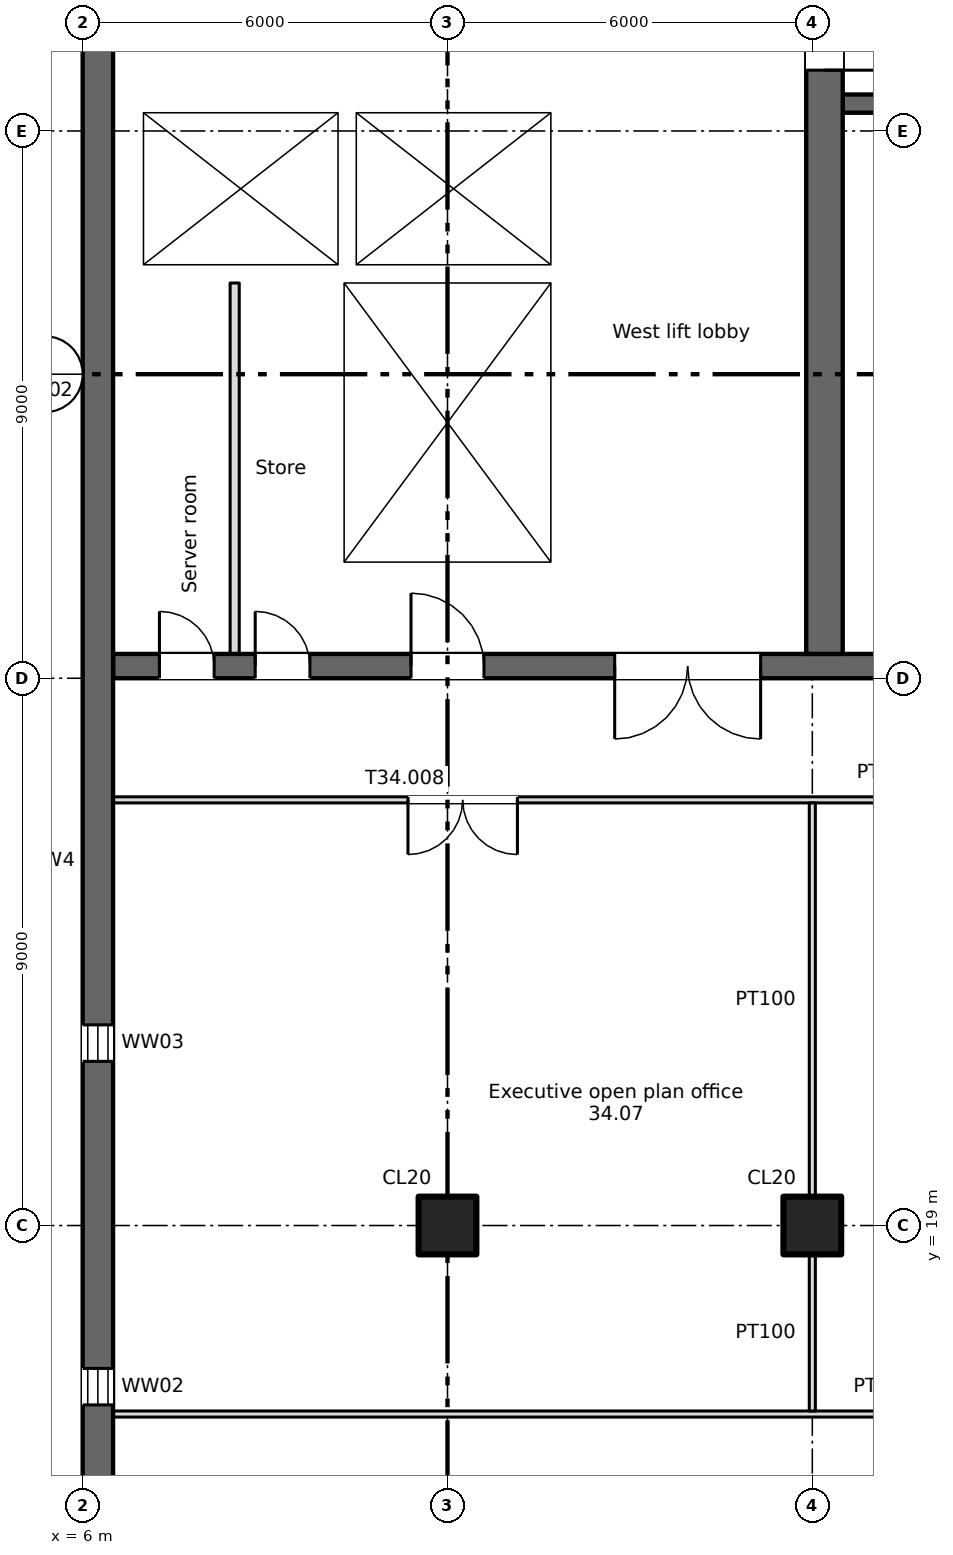
"""IFC4 building model, lengths in metres.
Left out: names, types, materials, properties, quantities, classifications, styles, units other than length and angle.
Written with IfcOpenShell. Run it as: python <this file> out.ifc"""

import sys

from ifc_helpers import new_model, si_unit, direction, frame, frame_2d, origin, origin_2d, place, context, subcontext, project, spatial, rectangle, extrude, element, fill, save


model = new_model("IFC4")
c1 = context("Model", 3, precision=1e-05, world=origin(), true_north=direction((0.0, 1.0)))
c2 = subcontext(c1, "Body", "Model", "MODEL_VIEW")
j1 = project(units=[si_unit("LENGTHUNIT", "METRE"), si_unit("PLANEANGLEUNIT", "RADIAN")], contexts=[c1])
p1 = place(None, origin())
s1 = spatial("IfcSite", under=j1, at=p1, CompositionType="ELEMENT")
p2 = place(p1, origin())
s2 = spatial("IfcBuilding", under=s1, at=p2, CompositionType="ELEMENT")
p3 = place(p2, frame((0.0, 0.0, 235.55)))
s3 = spatial("IfcBuildingStorey", under=s2, at=p3, CompositionType="ELEMENT", Elevation=235.55)
for number, where, z_axis, x_axis in (
    (1, (12.0, 19.0, 0.0), (0.0, 0.0, 1.0), (1.0, 0.0, 0.0)),
    (2, (18.0, 19.0, 0.0), (0.0, 0.0, 1.0), (1.0, 0.0, 0.0)),
):
    element("IfcColumn", number, at=place(p3, frame(where, z_axis=z_axis, x_axis=x_axis)), inside=s3, PredefinedType="COLUMN", context=c2, shape_type="SweptSolid", body=[
        extrude(rectangle(XDim=0.95, YDim=0.95, at=origin_2d()), origin(), (0.0, 0.0, 1.0), 3.4),
    ])
p4 = place(p3, frame((6.25, 8.5, 0.0), z_axis=(0.0, 0.0, 1.0), x_axis=(0.0, 1.0, 0.0)))
e3 = element("IfcWall", 3, at=p4, inside=s3, PredefinedType="SHEAR", context=c2, shape_type="SweptSolid", body=[
    extrude(rectangle(XDim=33.0, YDim=0.5, at=frame_2d((16.5, 0.0))), origin(), (0.0, 0.0, 1.0), 3.4),
])
p5 = place(p4, frame((1.6, 0.0, 0.6)))
e4 = element("IfcOpeningElement", 4, at=p5, cuts=e3, PredefinedType="OPENING", context=c2, shape_type="SweptSolid", body=[
    extrude(rectangle(XDim=0.6, YDim=2.4, at=frame_2d((0.3, 1.2))), frame((0.0, 0.26, 0.0), z_axis=(0.0, -1.0, 0.0), x_axis=(1.0, 0.0, 0.0)), (0.0, 0.0, 1.0), 0.52),
])
p6 = place(p4, frame((7.55, 0.0, 0.6)))
e5 = element("IfcOpeningElement", 5, at=p6, cuts=e3, PredefinedType="OPENING", context=c2, shape_type="SweptSolid", body=[
    extrude(rectangle(XDim=0.6, YDim=2.4, at=frame_2d((0.3, 1.2))), frame((0.0, 0.26, 0.0), z_axis=(0.0, -1.0, 0.0), x_axis=(1.0, 0.0, 0.0)), (0.0, 0.0, 1.0), 0.52),
])
p7 = place(p4, frame((13.2, 0.0, 0.6)))
e6 = element("IfcOpeningElement", 6, at=p7, cuts=e3, PredefinedType="OPENING", context=c2, shape_type="SweptSolid", body=[
    extrude(rectangle(XDim=0.6, YDim=2.4, at=frame_2d((0.3, 1.2))), frame((0.0, 0.26, 0.0), z_axis=(0.0, -1.0, 0.0), x_axis=(1.0, 0.0, 0.0)), (0.0, 0.0, 1.0), 0.52),
])
p8 = place(p3, frame((6.5, 28.2, 0.0), z_axis=(0.0, 0.0, 1.0), x_axis=(1.0, 0.0, 0.0)))
e7 = element("IfcWall", 7, at=p8, inside=s3, PredefinedType="SHEAR", context=c2, shape_type="SweptSolid", body=[
    extrude(rectangle(XDim=58.0, YDim=0.4, at=frame_2d((29.0, 0.0))), origin(), (0.0, 0.0, 1.0), 3.4),
])
p9 = place(p8, frame((13.012, 0.0, 0.0)))
e8 = element("IfcOpeningElement", 8, at=p9, cuts=e7, PredefinedType="OPENING", context=c2, shape_type="SweptSolid", body=[
    extrude(rectangle(XDim=0.9, YDim=2.1, at=frame_2d((0.45, 1.05))), frame((0.0, 0.21, 0.0), z_axis=(0.0, -1.0, 0.0), x_axis=(1.0, 0.0, 0.0)), (0.0, 0.0, 1.0), 0.42),
])
p10 = place(p8, frame((15.587, 0.0, 0.0)))
e9 = element("IfcOpeningElement", 9, at=p10, cuts=e7, PredefinedType="OPENING", context=c2, shape_type="SweptSolid", body=[
    extrude(rectangle(XDim=0.9, YDim=2.1, at=frame_2d((0.45, 1.05))), frame((0.0, 0.21, 0.0), z_axis=(0.0, -1.0, 0.0), x_axis=(1.0, 0.0, 0.0)), (0.0, 0.0, 1.0), 0.42),
])
p11 = place(p8, frame((48.512, 0.0, 0.0)))
e10 = element("IfcOpeningElement", 10, at=p11, cuts=e7, PredefinedType="OPENING", context=c2, shape_type="SweptSolid", body=[
    extrude(rectangle(XDim=0.9, YDim=2.1, at=frame_2d((0.45, 1.05))), frame((0.0, 0.21, 0.0), z_axis=(0.0, -1.0, 0.0), x_axis=(1.0, 0.0, 0.0)), (0.0, 0.0, 1.0), 0.42),
])
p12 = place(p8, frame((51.087, 0.0, 0.0)))
e11 = element("IfcOpeningElement", 11, at=p12, cuts=e7, PredefinedType="OPENING", context=c2, shape_type="SweptSolid", body=[
    extrude(rectangle(XDim=0.9, YDim=2.1, at=frame_2d((0.45, 1.05))), frame((0.0, 0.21, 0.0), z_axis=(0.0, -1.0, 0.0), x_axis=(1.0, 0.0, 0.0)), (0.0, 0.0, 1.0), 0.42),
])
p13 = place(p8, frame((0.762, 0.0, 0.0)))
e12 = element("IfcOpeningElement", 12, at=p13, cuts=e7, PredefinedType="OPENING", context=c2, shape_type="SweptSolid", body=[
    extrude(rectangle(XDim=0.9, YDim=2.1, at=frame_2d((0.45, 1.05))), frame((0.0, 0.21, 0.0), z_axis=(0.0, -1.0, 0.0), x_axis=(1.0, 0.0, 0.0)), (0.0, 0.0, 1.0), 0.42),
])
p14 = place(p8, frame((2.337, 0.0, 0.0)))
e13 = element("IfcOpeningElement", 13, at=p14, cuts=e7, PredefinedType="OPENING", context=c2, shape_type="SweptSolid", body=[
    extrude(rectangle(XDim=0.9, YDim=2.1, at=frame_2d((0.45, 1.05))), frame((0.0, 0.21, 0.0), z_axis=(0.0, -1.0, 0.0), x_axis=(1.0, 0.0, 0.0)), (0.0, 0.0, 1.0), 0.42),
])
p15 = place(p8, frame((4.9, 0.0, 0.0)))
e14 = element("IfcOpeningElement", 14, at=p15, cuts=e7, PredefinedType="OPENING", context=c2, shape_type="SweptSolid", body=[
    extrude(rectangle(XDim=1.2, YDim=2.1, at=frame_2d((0.6, 1.05))), frame((0.0, 0.21, 0.0), z_axis=(0.0, -1.0, 0.0), x_axis=(1.0, 0.0, 0.0)), (0.0, 0.0, 1.0), 0.42),
])
p16 = place(p8, frame((31.9, 0.0, 0.0)))
e15 = element("IfcOpeningElement", 15, at=p16, cuts=e7, PredefinedType="OPENING", context=c2, shape_type="SweptSolid", body=[
    extrude(rectangle(XDim=1.2, YDim=2.1, at=frame_2d((0.6, 1.05))), frame((0.0, 0.21, 0.0), z_axis=(0.0, -1.0, 0.0), x_axis=(1.0, 0.0, 0.0)), (0.0, 0.0, 1.0), 0.42),
])
p17 = place(p8, frame((55.4, 0.0, 0.0)))
e16 = element("IfcOpeningElement", 16, at=p17, cuts=e7, PredefinedType="OPENING", context=c2, shape_type="SweptSolid", body=[
    extrude(rectangle(XDim=1.2, YDim=2.1, at=frame_2d((0.6, 1.05))), frame((0.0, 0.21, 0.0), z_axis=(0.0, -1.0, 0.0), x_axis=(1.0, 0.0, 0.0)), (0.0, 0.0, 1.0), 0.42),
])
p18 = place(p8, frame((21.9, 0.0, 0.0)))
e17 = element("IfcOpeningElement", 17, at=p18, cuts=e7, PredefinedType="OPENING", context=c2, shape_type="SweptSolid", body=[
    extrude(rectangle(XDim=1.2, YDim=2.1, at=frame_2d((0.6, 1.05))), frame((0.0, 0.21, 0.0), z_axis=(0.0, -1.0, 0.0), x_axis=(1.0, 0.0, 0.0)), (0.0, 0.0, 1.0), 0.42),
])
p19 = place(p8, frame((41.9, 0.0, 0.0)))
e18 = element("IfcOpeningElement", 18, at=p19, cuts=e7, PredefinedType="OPENING", context=c2, shape_type="SweptSolid", body=[
    extrude(rectangle(XDim=1.2, YDim=2.1, at=frame_2d((0.6, 1.05))), frame((0.0, 0.21, 0.0), z_axis=(0.0, -1.0, 0.0), x_axis=(1.0, 0.0, 0.0)), (0.0, 0.0, 1.0), 0.42),
])
p20 = place(p8, frame((25.05, 0.0, 0.0)))
e19 = element("IfcOpeningElement", 19, at=p20, cuts=e7, PredefinedType="OPENING", context=c2, shape_type="SweptSolid", body=[
    extrude(rectangle(XDim=2.4, YDim=2.1, at=frame_2d((1.2, 1.05))), frame((0.0, 0.21, 0.0), z_axis=(0.0, -1.0, 0.0), x_axis=(1.0, 0.0, 0.0)), (0.0, 0.0, 1.0), 0.42),
])
p21 = place(p8, frame((37.55, 0.0, 0.0)))
e20 = element("IfcOpeningElement", 20, at=p21, cuts=e7, PredefinedType="OPENING", context=c2, shape_type="SweptSolid", body=[
    extrude(rectangle(XDim=2.4, YDim=2.1, at=frame_2d((1.2, 1.05))), frame((0.0, 0.21, 0.0), z_axis=(0.0, -1.0, 0.0), x_axis=(1.0, 0.0, 0.0)), (0.0, 0.0, 1.0), 0.42),
])
p22 = place(p8, frame((8.25, 0.0, 0.0)))
e21 = element("IfcOpeningElement", 21, at=p22, cuts=e7, PredefinedType="OPENING", context=c2, shape_type="SweptSolid", body=[
    extrude(rectangle(XDim=2.4, YDim=2.1, at=frame_2d((1.2, 1.05))), frame((0.0, 0.21, 0.0), z_axis=(0.0, -1.0, 0.0), x_axis=(1.0, 0.0, 0.0)), (0.0, 0.0, 1.0), 0.42),
])
p23 = place(p8, frame((29.05, 0.0, 0.0)))
e22 = element("IfcOpeningElement", 22, at=p23, cuts=e7, PredefinedType="OPENING", context=c2, shape_type="SweptSolid", body=[
    extrude(rectangle(XDim=0.9, YDim=2.1, at=frame_2d((0.45, 1.05))), frame((0.0, 0.21, 0.0), z_axis=(0.0, -1.0, 0.0), x_axis=(1.0, 0.0, 0.0)), (0.0, 0.0, 1.0), 0.42),
])
p24 = place(p8, frame((35.05, 0.0, 0.0)))
e23 = element("IfcOpeningElement", 23, at=p24, cuts=e7, PredefinedType="OPENING", context=c2, shape_type="SweptSolid", body=[
    extrude(rectangle(XDim=0.9, YDim=2.1, at=frame_2d((0.45, 1.05))), frame((0.0, 0.21, 0.0), z_axis=(0.0, -1.0, 0.0), x_axis=(1.0, 0.0, 0.0)), (0.0, 0.0, 1.0), 0.42),
])
p25 = place(p3, frame((6.75, 28.4, 0.0), z_axis=(0.0, 0.0, 1.0), x_axis=(0.0, 1.0, 0.0)))
e24 = element("IfcWall", 24, at=p25, inside=s3, PredefinedType="SHEAR", context=c2, shape_type="SweptSolid", body=[
    extrude(rectangle(XDim=12.85, YDim=0.5, at=frame_2d((6.425, 0.0))), origin(), (0.0, 0.0, 1.0), 3.4),
])
p26 = place(p3, frame((18.2, 28.4, 0.0), z_axis=(0.0, 0.0, 1.0), x_axis=(0.0, 1.0, 0.0)))
e25 = element("IfcWall", 25, at=p26, inside=s3, PredefinedType="SHEAR", context=c2, shape_type="SweptSolid", body=[
    extrude(rectangle(XDim=17.0, YDim=0.6, at=frame_2d((8.5, 0.0))), origin(), (0.0, 0.0, 1.0), 3.4),
])
p27 = place(p26, frame((9.6, 0.0, 0.0)))
e26 = element("IfcOpeningElement", 26, at=p27, cuts=e25, PredefinedType="OPENING", context=c2, shape_type="SweptSolid", body=[
    extrude(rectangle(XDim=2.0, YDim=2.1, at=frame_2d((1.0, 1.05))), frame((0.0, 0.31, 0.0), z_axis=(0.0, -1.0, 0.0), x_axis=(1.0, 0.0, 0.0)), (0.0, 0.0, 1.0), 0.62),
])
p28 = place(p26, frame((15.45, 0.0, 0.0)))
e27 = element("IfcOpeningElement", 27, at=p28, cuts=e25, PredefinedType="OPENING", context=c2, shape_type="SweptSolid", body=[
    extrude(rectangle(XDim=1.2, YDim=2.1, at=frame_2d((0.6, 1.05))), frame((0.0, 0.31, 0.0), z_axis=(0.0, -1.0, 0.0), x_axis=(1.0, 0.0, 0.0)), (0.0, 0.0, 1.0), 0.62),
])
for number, where, z_axis, x_axis in (
    (28, (10.15, 28.4, 0.0), (0.0, 0.0, 1.0), (0.0, 1.0, 0.0)),
    (29, (13.85, 28.4, 0.0), (0.0, 0.0, 1.0), (0.0, 1.0, 0.0)),
):
    element("IfcWall", number, at=place(p3, frame(where, z_axis=z_axis, x_axis=x_axis)), inside=s3, PredefinedType="SHEAR", context=c2, shape_type="SweptSolid", body=[
        extrude(rectangle(XDim=6.1, YDim=0.3, at=frame_2d((3.05, 0.0))), origin(), (0.0, 0.0, 1.0), 3.4),
    ])
p29 = place(p3, frame((7.0, 34.65, 0.0), z_axis=(0.0, 0.0, 1.0), x_axis=(1.0, 0.0, 0.0)))
e30 = element("IfcWall", 30, at=p29, inside=s3, PredefinedType="SHEAR", context=c2, shape_type="SweptSolid", body=[
    extrude(rectangle(XDim=7.0, YDim=0.3, at=frame_2d((3.5, 0.0))), origin(), (0.0, 0.0, 1.0), 3.4),
])
p30 = place(p3, frame((18.5, 34.65, 0.0), z_axis=(0.0, 0.0, 1.0), x_axis=(1.0, 0.0, 0.0)))
e31 = element("IfcWall", 31, at=p30, inside=s3, PredefinedType="SHEAR", context=c2, shape_type="SweptSolid", body=[
    extrude(rectangle(XDim=12.2, YDim=0.3, at=frame_2d((6.1, 0.0))), origin(), (0.0, 0.0, 1.0), 3.4),
])
p31 = place(p30, frame((9.8, 0.0, 0.0)))
e32 = element("IfcOpeningElement", 32, at=p31, cuts=e31, PredefinedType="OPENING", context=c2, shape_type="SweptSolid", body=[
    extrude(rectangle(XDim=1.1, YDim=2.1, at=frame_2d((0.55, 1.05))), frame((0.0, 0.16, 0.0), z_axis=(0.0, -1.0, 0.0), x_axis=(1.0, 0.0, 0.0)), (0.0, 0.0, 1.0), 0.32),
])
p32 = place(p3, frame((7.0, 37.45, 0.0), z_axis=(0.0, 0.0, 1.0), x_axis=(1.0, 0.0, 0.0)))
e33 = element("IfcWall", 33, at=p32, inside=s3, PredefinedType="SHEAR", context=c2, shape_type="SweptSolid", body=[
    extrude(rectangle(XDim=7.0, YDim=0.3, at=frame_2d((3.5, 0.0))), origin(), (0.0, 0.0, 1.0), 3.4),
])
p33 = place(p32, frame((1.05, 0.0, 0.0)))
e34 = element("IfcOpeningElement", 34, at=p33, cuts=e33, PredefinedType="OPENING", context=c2, shape_type="SweptSolid", body=[
    extrude(rectangle(XDim=1.1, YDim=2.1, at=frame_2d((0.55, 1.05))), frame((0.0, 0.16, 0.0), z_axis=(0.0, -1.0, 0.0), x_axis=(1.0, 0.0, 0.0)), (0.0, 0.0, 1.0), 0.32),
])
p34 = place(p32, frame((4.55, 0.0, 0.0)))
e35 = element("IfcOpeningElement", 35, at=p34, cuts=e33, PredefinedType="OPENING", context=c2, shape_type="SweptSolid", body=[
    extrude(rectangle(XDim=1.1, YDim=2.1, at=frame_2d((0.55, 1.05))), frame((0.0, 0.16, 0.0), z_axis=(0.0, -1.0, 0.0), x_axis=(1.0, 0.0, 0.0)), (0.0, 0.0, 1.0), 0.32),
])
p35 = place(p3, frame((30.7, 37.45, 0.0), z_axis=(0.0, 0.0, 1.0), x_axis=(-1.0, 0.0, 0.0)))
e36 = element("IfcWall", 36, at=p35, inside=s3, PredefinedType="SHEAR", context=c2, shape_type="SweptSolid", body=[
    extrude(rectangle(XDim=12.2, YDim=0.3, at=frame_2d((6.1, 0.0))), origin(), (0.0, 0.0, 1.0), 3.4),
])
p36 = place(p35, frame((7.4, 0.0, 0.0)))
e37 = element("IfcOpeningElement", 37, at=p36, cuts=e36, PredefinedType="OPENING", context=c2, shape_type="SweptSolid", body=[
    extrude(rectangle(XDim=0.9, YDim=2.1, at=frame_2d((0.45, 1.05))), frame((0.0, 0.16, 0.0), z_axis=(0.0, -1.0, 0.0), x_axis=(1.0, 0.0, 0.0)), (0.0, 0.0, 1.0), 0.32),
])
for number, where, z_axis, x_axis in (
    (38, (13.85, 34.8, 0.0), (0.0, 0.0, 1.0), (0.0, 1.0, 0.0)),
    (39, (10.35, 34.8, 0.0), (0.0, 0.0, 1.0), (0.0, 1.0, 0.0)),
):
    element("IfcWall", number, at=place(p3, frame(where, z_axis=z_axis, x_axis=x_axis)), inside=s3, PredefinedType="SHEAR", context=c2, shape_type="SweptSolid", body=[
        extrude(rectangle(XDim=2.5, YDim=0.3, at=frame_2d((1.25, 0.0))), origin(), (0.0, 0.0, 1.0), 3.4),
    ])
p37 = place(p3, frame((8.5, 28.4, 0.0), z_axis=(0.0, 0.0, 1.0), x_axis=(0.0, 1.0, 0.0)))
e40 = element("IfcWall", 40, at=p37, inside=s3, PredefinedType="PARTITIONING", context=c2, shape_type="SweptSolid", body=[
    extrude(rectangle(XDim=6.1, YDim=0.15, at=frame_2d((3.05, 0.0))), origin(), (0.0, 0.0, 1.0), 3.4),
])
p38 = place(p3, frame((6.5, 15.9, 0.0), z_axis=(0.0, 0.0, 1.0), x_axis=(1.0, 0.0, 0.0)))
e41 = element("IfcWall", 41, at=p38, inside=s3, PredefinedType="PARTITIONING", context=c2, shape_type="SweptSolid", body=[
    extrude(rectangle(XDim=25.35, YDim=0.1, at=frame_2d((12.675, 0.0))), origin(), (0.0, 0.0, 1.0), 3.4),
])
p39 = place(p3, frame((6.5, 26.0, 0.0), z_axis=(0.0, 0.0, 1.0), x_axis=(1.0, 0.0, 0.0)))
e42 = element("IfcWall", 42, at=p39, inside=s3, PredefinedType="PARTITIONING", context=c2, shape_type="SweptSolid", body=[
    extrude(rectangle(XDim=25.45, YDim=0.1, at=frame_2d((12.725, 0.0))), origin(), (0.0, 0.0, 1.0), 3.4),
])
p40 = place(p39, frame((17.55, 0.0, 0.0)))
e43 = element("IfcOpeningElement", 43, at=p40, cuts=e42, PredefinedType="OPENING", context=c2, shape_type="SweptSolid", body=[
    extrude(rectangle(XDim=1.8, YDim=2.1, at=frame_2d((0.9, 1.05))), frame((0.0, 0.06, 0.0), z_axis=(0.0, -1.0, 0.0), x_axis=(1.0, 0.0, 0.0)), (0.0, 0.0, 1.0), 0.12),
])
p41 = place(p39, frame((4.85, 0.0, 0.0)))
e44 = element("IfcOpeningElement", 44, at=p41, cuts=e42, PredefinedType="OPENING", context=c2, shape_type="SweptSolid", body=[
    extrude(rectangle(XDim=1.8, YDim=2.1, at=frame_2d((0.9, 1.05))), frame((0.0, 0.06, 0.0), z_axis=(0.0, -1.0, 0.0), x_axis=(1.0, 0.0, 0.0)), (0.0, 0.0, 1.0), 0.12),
])
p42 = place(p3, frame((18.0, 15.95, 0.0), z_axis=(0.0, 0.0, 1.0), x_axis=(0.0, 1.0, 0.0)))
e45 = element("IfcWall", 45, at=p42, inside=s3, PredefinedType="PARTITIONING", context=c2, shape_type="SweptSolid", body=[
    extrude(rectangle(XDim=2.575, YDim=0.1, at=frame_2d((1.288, 0.0))), origin(), (0.0, 0.0, 1.0), 3.4),
])
p43 = place(p3, frame((18.0, 19.475, 0.0), z_axis=(0.0, 0.0, 1.0), x_axis=(0.0, 1.0, 0.0)))
e46 = element("IfcWall", 46, at=p43, inside=s3, PredefinedType="PARTITIONING", context=c2, shape_type="SweptSolid", body=[
    extrude(rectangle(XDim=6.475, YDim=0.1, at=frame_2d((3.237, 0.0))), origin(), (0.0, 0.0, 1.0), 3.4),
])
p44 = place(p6, origin())
e47 = element("IfcWindow", 47, at=p44, inside=s3, PartitioningType="SINGLE_PANEL", PredefinedType="WINDOW", context=c2, shape_type="SweptSolid", body=[
    extrude(rectangle(XDim=0.6, YDim=2.4, at=frame_2d((0.3, 1.2))), frame((0.0, 0.03, 0.0), z_axis=(0.0, -1.0, 0.0), x_axis=(1.0, 0.0, 0.0)), (0.0, 0.0, 1.0), 0.06),
])
fill(e5, e47)
p45 = place(p7, origin())
e48 = element("IfcWindow", 48, at=p45, inside=s3, PartitioningType="SINGLE_PANEL", PredefinedType="WINDOW", context=c2, shape_type="SweptSolid", body=[
    extrude(rectangle(XDim=0.6, YDim=2.4, at=frame_2d((0.3, 1.2))), frame((0.0, 0.03, 0.0), z_axis=(0.0, -1.0, 0.0), x_axis=(1.0, 0.0, 0.0)), (0.0, 0.0, 1.0), 0.06),
])
fill(e6, e48)
p46 = place(p13, origin())
e49 = element("IfcDoor", 49, at=p46, inside=s3, OperationType="SINGLE_SWING_LEFT", PredefinedType="DOOR", context=c2, shape_type="SweptSolid", body=[
    extrude(rectangle(XDim=0.9, YDim=2.1, at=frame_2d((0.45, 1.05))), frame((0.0, 0.025, 0.0), z_axis=(0.0, -1.0, 0.0), x_axis=(1.0, 0.0, 0.0)), (0.0, 0.0, 1.0), 0.05),
])
fill(e12, e49)
p47 = place(p14, origin())
e50 = element("IfcDoor", 50, at=p47, inside=s3, OperationType="SINGLE_SWING_LEFT", PredefinedType="DOOR", context=c2, shape_type="SweptSolid", body=[
    extrude(rectangle(XDim=0.9, YDim=2.1, at=frame_2d((0.45, 1.05))), frame((0.0, 0.025, 0.0), z_axis=(0.0, -1.0, 0.0), x_axis=(1.0, 0.0, 0.0)), (0.0, 0.0, 1.0), 0.05),
])
fill(e13, e50)
p48 = place(p33, origin())
e51 = element("IfcDoor", 51, at=p48, inside=s3, OperationType="SLIDING_TO_LEFT", PredefinedType="DOOR", context=c2, shape_type="SweptSolid", body=[
    extrude(rectangle(XDim=1.1, YDim=2.1, at=frame_2d((0.55, 1.05))), frame((0.0, 0.025, 0.0), z_axis=(0.0, -1.0, 0.0), x_axis=(1.0, 0.0, 0.0)), (0.0, 0.0, 1.0), 0.05),
])
fill(e34, e51)
p49 = place(p34, origin())
e52 = element("IfcDoor", 52, at=p49, inside=s3, OperationType="SLIDING_TO_LEFT", PredefinedType="DOOR", context=c2, shape_type="SweptSolid", body=[
    extrude(rectangle(XDim=1.1, YDim=2.1, at=frame_2d((0.55, 1.05))), frame((0.0, 0.025, 0.0), z_axis=(0.0, -1.0, 0.0), x_axis=(1.0, 0.0, 0.0)), (0.0, 0.0, 1.0), 0.05),
])
fill(e35, e52)
p50 = place(p15, origin())
e53 = element("IfcDoor", 53, at=p50, inside=s3, OperationType="SINGLE_SWING_LEFT", PredefinedType="DOOR", context=c2, shape_type="SweptSolid", body=[
    extrude(rectangle(XDim=1.2, YDim=2.1, at=frame_2d((0.6, 1.05))), frame((0.0, 0.025, 0.0), z_axis=(0.0, -1.0, 0.0), x_axis=(1.0, 0.0, 0.0)), (0.0, 0.0, 1.0), 0.05),
])
fill(e14, e53)
p51 = place(p22, origin())
e54 = element("IfcDoor", 54, at=p51, inside=s3, OperationType="DOUBLE_DOOR_SINGLE_SWING", PredefinedType="DOOR", context=c2, shape_type="SweptSolid", body=[
    extrude(rectangle(XDim=2.4, YDim=2.1, at=frame_2d((1.2, 1.05))), frame((0.0, 0.025, 0.0), z_axis=(0.0, -1.0, 0.0), x_axis=(1.0, 0.0, 0.0)), (0.0, 0.0, 1.0), 0.05),
])
fill(e21, e54)
p52 = place(p27, origin())
e55 = element("IfcDoor", 55, at=p52, inside=s3, OperationType="DOUBLE_DOOR_SINGLE_SWING", PredefinedType="DOOR", context=c2, shape_type="SweptSolid", body=[
    extrude(rectangle(XDim=2.0, YDim=2.1, at=frame_2d((1.0, 1.05))), frame((0.0, 0.025, 0.0), z_axis=(0.0, -1.0, 0.0), x_axis=(1.0, 0.0, 0.0)), (0.0, 0.0, 1.0), 0.05),
])
fill(e26, e55)
p53 = place(p41, origin())
e56 = element("IfcDoor", 56, at=p53, inside=s3, OperationType="DOUBLE_DOOR_SINGLE_SWING", PredefinedType="DOOR", context=c2, shape_type="SweptSolid", body=[
    extrude(rectangle(XDim=1.8, YDim=2.1, at=frame_2d((0.9, 1.05))), frame((0.0, 0.025, 0.0), z_axis=(0.0, -1.0, 0.0), x_axis=(1.0, 0.0, 0.0)), (0.0, 0.0, 1.0), 0.05),
])
fill(e44, e56)
save(model, sys.argv[1])
